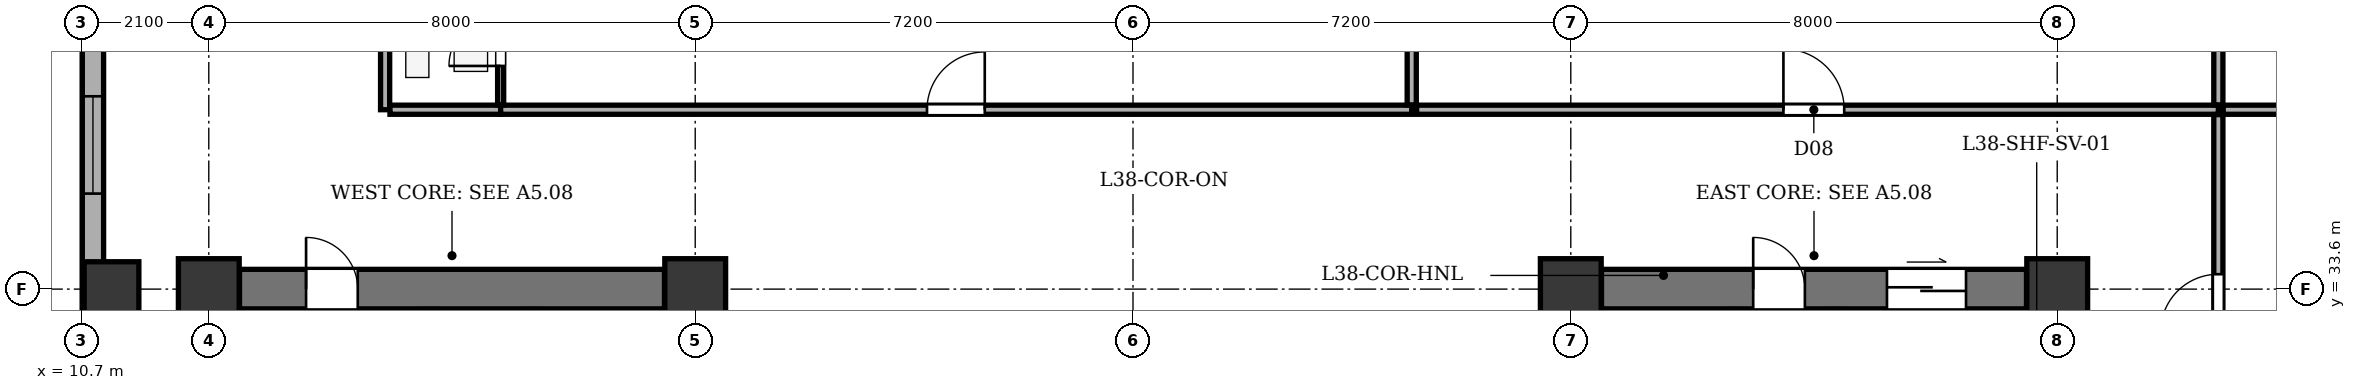
"""IFC4 building model, lengths in metres.
Left out: names, types, materials, properties, quantities, classifications, styles, units other than length and angle.
Written with IfcOpenShell. Run it as: python <this file> out.ifc"""

import sys

from ifc_helpers import new_model, si_unit, direction, frame, frame_2d, origin, origin_2d, place, context, subcontext, project, spatial, rectangle, extrude, element, fill, save


model = new_model("IFC4")
c1 = context("Model", 3, precision=1e-05, world=origin(), true_north=direction((0.0, 1.0)))
c2 = subcontext(c1, "Body", "Model", "MODEL_VIEW")
j1 = project(units=[si_unit("LENGTHUNIT", "METRE"), si_unit("PLANEANGLEUNIT", "RADIAN")], contexts=[c1])
p1 = place(None, origin())
s1 = spatial("IfcSite", under=j1, at=p1, CompositionType="ELEMENT")
p2 = place(p1, origin())
s2 = spatial("IfcBuilding", under=s1, at=p2, CompositionType="ELEMENT")
p3 = place(p2, frame((0.0, 0.0, 151.8)))
s3 = spatial("IfcBuildingStorey", under=s2, at=p3, CompositionType="ELEMENT", Elevation=151.8)
for number, where, z_axis, x_axis in (
    (1, (12.8, 33.6, 0.0), (0.0, 0.0, 1.0), (1.0, 0.0, 0.0)),
    (2, (20.8, 33.6, 0.0), (0.0, 0.0, 1.0), (1.0, 0.0, 0.0)),
    (3, (35.2, 33.6, 0.0), (0.0, 0.0, 1.0), (1.0, 0.0, 0.0)),
    (4, (43.2, 33.6, 0.0), (0.0, 0.0, 1.0), (1.0, 0.0, 0.0)),
):
    element("IfcColumn", number, at=place(p3, frame(where, z_axis=z_axis, x_axis=x_axis)), inside=s3, PredefinedType="COLUMN", context=c2, shape_type="SweptSolid", body=[
        extrude(rectangle(XDim=1.0, YDim=1.0, at=origin_2d()), origin(), (0.0, 0.0, 1.0), 3.5),
    ])
p4 = place(p3, frame((11.2, 33.6, 0.0), z_axis=(0.0, 0.0, 1.0), x_axis=(1.0, 0.0, 0.0)))
e5 = element("IfcColumn", 5, at=p4, inside=s3, PredefinedType="COLUMN", context=c2, shape_type="SweptSolid", body=[
    extrude(rectangle(XDim=0.9, YDim=0.9, at=origin_2d()), origin(), (0.0, 0.0, 1.0), 3.5),
])
p5 = place(p3, frame((10.895, 6.5, 0.0), z_axis=(0.0, 0.0, 1.0), x_axis=(0.0, 1.0, 0.0)))
e6 = element("IfcWall", 6, at=p5, inside=s3, PredefinedType="STANDARD", context=c2, shape_type="SweptSolid", body=[
    extrude(rectangle(XDim=35.0, YDim=0.35, at=frame_2d((17.5, 0.0))), origin(), (0.0, 0.0, 1.0), 2.785),
])
p6 = place(p5, frame((3.31, 0.0, 0.75)))
e7 = element("IfcOpeningElement", 7, at=p6, cuts=e6, PredefinedType="OPENING", context=c2, shape_type="SweptSolid", body=[
    extrude(rectangle(XDim=1.6, YDim=1.75, at=frame_2d((0.8, 0.875))), frame((0.0, 0.185, 0.0), z_axis=(0.0, -1.0, 0.0), x_axis=(1.0, 0.0, 0.0)), (0.0, 0.0, 1.0), 0.37),
])
p7 = place(p5, frame((9.216, 0.0, 0.75)))
e8 = element("IfcOpeningElement", 8, at=p7, cuts=e6, PredefinedType="OPENING", context=c2, shape_type="SweptSolid", body=[
    extrude(rectangle(XDim=2.1, YDim=1.75, at=frame_2d((1.05, 0.875))), frame((0.0, 0.185, 0.0), z_axis=(0.0, -1.0, 0.0), x_axis=(1.0, 0.0, 0.0)), (0.0, 0.0, 1.0), 0.37),
])
p8 = place(p5, frame((17.164, 0.0, 0.75)))
e9 = element("IfcOpeningElement", 9, at=p8, cuts=e6, PredefinedType="OPENING", context=c2, shape_type="SweptSolid", body=[
    extrude(rectangle(XDim=1.6, YDim=1.75, at=frame_2d((0.8, 0.875))), frame((0.0, 0.185, 0.0), z_axis=(0.0, -1.0, 0.0), x_axis=(1.0, 0.0, 0.0)), (0.0, 0.0, 1.0), 0.37),
])
p9 = place(p5, frame((22.386, 0.0, 0.75)))
e10 = element("IfcOpeningElement", 10, at=p9, cuts=e6, PredefinedType="OPENING", context=c2, shape_type="SweptSolid", body=[
    extrude(rectangle(XDim=2.1, YDim=1.75, at=frame_2d((1.05, 0.875))), frame((0.0, 0.185, 0.0), z_axis=(0.0, -1.0, 0.0), x_axis=(1.0, 0.0, 0.0)), (0.0, 0.0, 1.0), 0.37),
])
p10 = place(p5, frame((28.671, 0.0, 0.75)))
e11 = element("IfcOpeningElement", 11, at=p10, cuts=e6, PredefinedType="OPENING", context=c2, shape_type="SweptSolid", body=[
    extrude(rectangle(XDim=1.6, YDim=1.75, at=frame_2d((0.8, 0.875))), frame((0.0, 0.185, 0.0), z_axis=(0.0, -1.0, 0.0), x_axis=(1.0, 0.0, 0.0)), (0.0, 0.0, 1.0), 0.37),
])
p11 = place(p5, frame((31.755, 0.0, 0.75)))
e12 = element("IfcOpeningElement", 12, at=p11, cuts=e6, PredefinedType="OPENING", context=c2, shape_type="SweptSolid", body=[
    extrude(rectangle(XDim=1.6, YDim=1.75, at=frame_2d((0.8, 0.875))), frame((0.0, 0.185, 0.0), z_axis=(0.0, -1.0, 0.0), x_axis=(1.0, 0.0, 0.0)), (0.0, 0.0, 1.0), 0.37),
])
p12 = place(p3, frame((13.305, 33.6, 0.0), z_axis=(0.0, 0.0, 1.0), x_axis=(1.0, 0.0, 0.0)))
e13 = element("IfcWall", 13, at=p12, inside=s3, PredefinedType="SHEAR", context=c2, shape_type="SweptSolid", body=[
    extrude(rectangle(XDim=6.99, YDim=0.65, at=frame_2d((3.495, 0.0))), origin(), (0.0, 0.0, 1.0), 3.2),
])
p13 = place(p12, frame((1.095, 0.0, 0.0)))
e14 = element("IfcOpeningElement", 14, at=p13, cuts=e13, PredefinedType="OPENING", context=c2, shape_type="SweptSolid", body=[
    extrude(rectangle(XDim=0.85, YDim=2.02, at=frame_2d((0.425, 1.01))), frame((0.0, 0.335, 0.0), z_axis=(0.0, -1.0, 0.0), x_axis=(1.0, 0.0, 0.0)), (0.0, 0.0, 1.0), 0.67),
])
p14 = place(p3, frame((16.435, 21.135, 0.0), z_axis=(0.0, 0.0, 1.0), x_axis=(0.0, 1.0, 0.0)))
e15 = element("IfcWall", 15, at=p14, inside=s3, PredefinedType="SHEAR", context=c2, shape_type="SweptSolid", body=[
    extrude(rectangle(XDim=12.13, YDim=0.25, at=frame_2d((6.065, 0.0))), origin(), (0.0, 0.0, 1.0), 3.2),
])
p15 = place(p14, frame((0.515, 0.0, 0.0)))
e16 = element("IfcOpeningElement", 16, at=p15, cuts=e15, PredefinedType="OPENING", context=c2, shape_type="SweptSolid", body=[
    extrude(rectangle(XDim=1.2, YDim=2.15, at=frame_2d((0.6, 1.075))), frame((0.0, 0.135, 0.0), z_axis=(0.0, -1.0, 0.0), x_axis=(1.0, 0.0, 0.0)), (0.0, 0.0, 1.0), 0.27),
])
p16 = place(p14, frame((2.665, 0.0, 0.0)))
e17 = element("IfcOpeningElement", 17, at=p16, cuts=e15, PredefinedType="OPENING", context=c2, shape_type="SweptSolid", body=[
    extrude(rectangle(XDim=1.15, YDim=2.15, at=frame_2d((0.575, 1.075))), frame((0.0, 0.135, 0.0), z_axis=(0.0, -1.0, 0.0), x_axis=(1.0, 0.0, 0.0)), (0.0, 0.0, 1.0), 0.27),
])
p17 = place(p3, frame((18.12, 31.17, 0.0), z_axis=(0.0, 0.0, 1.0), x_axis=(0.0, 1.0, 0.0)))
e18 = element("IfcWall", 18, at=p17, inside=s3, PredefinedType="PARTITIONING", context=c2, shape_type="SweptSolid", body=[
    extrude(rectangle(XDim=2.095, YDim=0.18, at=frame_2d((1.047, 0.0))), origin(), (0.0, 0.0, 1.0), 3.2),
])
p18 = place(p3, frame((35.705, 33.6, 0.0), z_axis=(0.0, 0.0, 1.0), x_axis=(1.0, 0.0, 0.0)))
e19 = element("IfcWall", 19, at=p18, inside=s3, PredefinedType="SHEAR", context=c2, shape_type="SweptSolid", body=[
    extrude(rectangle(XDim=6.99, YDim=0.65, at=frame_2d((3.495, 0.0))), origin(), (0.0, 0.0, 1.0), 3.2),
])
p19 = place(p18, frame((4.695, 0.0, 0.0)))
e20 = element("IfcOpeningElement", 20, at=p19, cuts=e19, PredefinedType="OPENING", context=c2, shape_type="SweptSolid", body=[
    extrude(rectangle(XDim=1.3, YDim=2.15, at=frame_2d((0.65, 1.075))), frame((0.0, 0.335, 0.0), z_axis=(0.0, -1.0, 0.0), x_axis=(1.0, 0.0, 0.0)), (0.0, 0.0, 1.0), 0.67),
])
p20 = place(p18, frame((2.495, 0.0, 0.0)))
e21 = element("IfcOpeningElement", 21, at=p20, cuts=e19, PredefinedType="OPENING", context=c2, shape_type="SweptSolid", body=[
    extrude(rectangle(XDim=0.85, YDim=2.02, at=frame_2d((0.425, 1.01))), frame((0.0, 0.335, 0.0), z_axis=(0.0, -1.0, 0.0), x_axis=(1.0, 0.0, 0.0)), (0.0, 0.0, 1.0), 0.67),
])
p21 = place(p3, frame((39.565, 21.135, 0.0), z_axis=(0.0, 0.0, 1.0), x_axis=(0.0, 1.0, 0.0)))
e22 = element("IfcWall", 22, at=p21, inside=s3, PredefinedType="SHEAR", context=c2, shape_type="SweptSolid", body=[
    extrude(rectangle(XDim=12.13, YDim=0.25, at=frame_2d((6.065, 0.0))), origin(), (0.0, 0.0, 1.0), 3.2),
])
p22 = place(p21, frame((0.515, 0.0, 0.0)))
e23 = element("IfcOpeningElement", 23, at=p22, cuts=e22, PredefinedType="OPENING", context=c2, shape_type="SweptSolid", body=[
    extrude(rectangle(XDim=1.2, YDim=2.15, at=frame_2d((0.6, 1.075))), frame((0.0, 0.135, 0.0), z_axis=(0.0, -1.0, 0.0), x_axis=(1.0, 0.0, 0.0)), (0.0, 0.0, 1.0), 0.27),
])
p23 = place(p21, frame((2.665, 0.0, 0.0)))
e24 = element("IfcOpeningElement", 24, at=p23, cuts=e22, PredefinedType="OPENING", context=c2, shape_type="SweptSolid", body=[
    extrude(rectangle(XDim=1.15, YDim=2.15, at=frame_2d((0.575, 1.075))), frame((0.0, 0.135, 0.0), z_axis=(0.0, -1.0, 0.0), x_axis=(1.0, 0.0, 0.0)), (0.0, 0.0, 1.0), 0.27),
])
p24 = place(p3, frame((37.9, 25.27, 0.0), z_axis=(0.0, 0.0, 1.0), x_axis=(0.0, 1.0, 0.0)))
e25 = element("IfcWall", 25, at=p24, inside=s3, PredefinedType="SOLIDWALL", context=c2, shape_type="SweptSolid", body=[
    extrude(rectangle(XDim=7.995, YDim=0.2, at=frame_2d((3.998, 0.0))), origin(), (0.0, 0.0, 1.0), 3.2),
])
p25 = place(p3, frame((15.7, 36.55, 0.0), z_axis=(0.0, 0.0, 1.0), x_axis=(0.0, 1.0, 0.0)))
e26 = element("IfcWall", 26, at=p25, inside=s3, PredefinedType="PARTITIONING", context=c2, shape_type="SweptSolid", body=[
    extrude(rectangle(XDim=9.575, YDim=0.15, at=frame_2d((4.788, 0.0))), origin(), (0.0, 0.0, 1.0), 3.2),
])
p26 = place(p3, frame((15.78, 36.55, 0.0), z_axis=(0.0, 0.0, 1.0), x_axis=(1.0, 0.0, 0.0)))
e27 = element("IfcWall", 27, at=p26, inside=s3, PredefinedType="PARTITIONING", context=c2, shape_type="SweptSolid", body=[
    extrude(rectangle(XDim=1.82, YDim=0.15, at=frame_2d((0.91, 0.0))), origin(), (0.0, 0.0, 1.0), 3.2),
])
p27 = place(p3, frame((17.6, 36.55, 0.0), z_axis=(0.0, 0.0, 1.0), x_axis=(1.0, 0.0, 0.0)))
e28 = element("IfcWall", 28, at=p27, inside=s3, PredefinedType="PARTITIONING", context=c2, shape_type="SweptSolid", body=[
    extrude(rectangle(XDim=14.984, YDim=0.15, at=frame_2d((7.492, 0.0))), origin(), (0.0, 0.0, 1.0), 3.2),
])
p28 = place(p27, frame((7.012, 0.0, 0.0)))
e29 = element("IfcOpeningElement", 29, at=p28, cuts=e28, PredefinedType="OPENING", context=c2, shape_type="SweptSolid", body=[
    extrude(rectangle(XDim=0.95, YDim=2.1, at=frame_2d((0.475, 1.05))), frame((0.0, 0.085, 0.0), z_axis=(0.0, -1.0, 0.0), x_axis=(1.0, 0.0, 0.0)), (0.0, 0.0, 1.0), 0.17),
])
p29 = place(p3, frame((17.6, 36.63, 0.0), z_axis=(0.0, 0.0, 1.0), x_axis=(0.0, 1.0, 0.0)))
e30 = element("IfcWall", 30, at=p29, inside=s3, PredefinedType="PARTITIONING", context=c2, shape_type="SweptSolid", body=[
    extrude(rectangle(XDim=2.25, YDim=0.1, at=frame_2d((1.125, 0.0))), origin(), (0.0, 0.0, 1.0), 3.2),
])
p30 = place(p29, frame((0.64, 0.0, 0.0)))
e31 = element("IfcOpeningElement", 31, at=p30, cuts=e30, PredefinedType="OPENING", context=c2, shape_type="SweptSolid", body=[
    extrude(rectangle(XDim=0.85, YDim=2.05, at=frame_2d((0.425, 1.025))), frame((0.0, 0.06, 0.0), z_axis=(0.0, -1.0, 0.0), x_axis=(1.0, 0.0, 0.0)), (0.0, 0.0, 1.0), 0.12),
])
p31 = place(p3, frame((32.584, 36.63, 0.0), z_axis=(0.0, 0.0, 1.0), x_axis=(0.0, 1.0, 0.0)))
e32 = element("IfcWall", 32, at=p31, inside=s3, PredefinedType="PARTITIONING", context=c2, shape_type="SweptSolid", body=[
    extrude(rectangle(XDim=9.495, YDim=0.15, at=frame_2d((4.748, 0.0))), origin(), (0.0, 0.0, 1.0), 3.2),
])
p32 = place(p3, frame((32.664, 36.55, 0.0), z_axis=(0.0, 0.0, 1.0), x_axis=(1.0, 0.0, 0.0)))
e33 = element("IfcWall", 33, at=p32, inside=s3, PredefinedType="PARTITIONING", context=c2, shape_type="SweptSolid", body=[
    extrude(rectangle(XDim=13.186, YDim=0.15, at=frame_2d((6.593, 0.0))), origin(), (0.0, 0.0, 1.0), 3.2),
])
p33 = place(p32, frame((6.033, 0.0, 0.0)))
e34 = element("IfcOpeningElement", 34, at=p33, cuts=e33, PredefinedType="OPENING", context=c2, shape_type="SweptSolid", body=[
    extrude(rectangle(XDim=1.0, YDim=2.1, at=frame_2d((0.5, 1.05))), frame((0.0, 0.085, 0.0), z_axis=(0.0, -1.0, 0.0), x_axis=(1.0, 0.0, 0.0)), (0.0, 0.0, 1.0), 0.17),
])
p34 = place(p3, frame((45.85, 36.63, 0.0), z_axis=(0.0, 0.0, 1.0), x_axis=(0.0, 1.0, 0.0)))
e35 = element("IfcWall", 35, at=p34, inside=s3, PredefinedType="PARTITIONING", context=c2, shape_type="SweptSolid", body=[
    extrude(rectangle(XDim=9.495, YDim=0.15, at=frame_2d((4.748, 0.0))), origin(), (0.0, 0.0, 1.0), 3.2),
])
p35 = place(p3, frame((45.93, 36.55, 0.0), z_axis=(0.0, 0.0, 1.0), x_axis=(1.0, 0.0, 0.0)))
e36 = element("IfcWall", 36, at=p35, inside=s3, PredefinedType="PARTITIONING", context=c2, shape_type="SweptSolid", body=[
    extrude(rectangle(XDim=9.395, YDim=0.15, at=frame_2d((4.698, 0.0))), origin(), (0.0, 0.0, 1.0), 3.2),
])
p36 = place(p3, frame((45.85, 30.28, 0.0), z_axis=(0.0, 0.0, 1.0), x_axis=(0.0, 1.0, 0.0)))
e37 = element("IfcWall", 37, at=p36, inside=s3, PredefinedType="PARTITIONING", context=c2, shape_type="SweptSolid", body=[
    extrude(rectangle(XDim=6.19, YDim=0.15, at=frame_2d((3.095, 0.0))), origin(), (0.0, 0.0, 1.0), 3.2),
])
p37 = place(p36, frame((2.615, 0.0, 0.0)))
e38 = element("IfcOpeningElement", 38, at=p37, cuts=e37, PredefinedType="OPENING", context=c2, shape_type="SweptSolid", body=[
    extrude(rectangle(XDim=0.95, YDim=2.1, at=frame_2d((0.475, 1.05))), frame((0.0, 0.085, 0.0), z_axis=(0.0, -1.0, 0.0), x_axis=(1.0, 0.0, 0.0)), (0.0, 0.0, 1.0), 0.17),
])
p38 = place(p10, origin())
e39 = element("IfcWindow", 39, at=p38, inside=s3, PartitioningType="SINGLE_PANEL", PredefinedType="WINDOW", context=c2, shape_type="SweptSolid", body=[
    extrude(rectangle(XDim=1.6, YDim=1.75, at=frame_2d((0.8, 0.875))), frame((0.0, -0.01, 0.0), z_axis=(0.0, -1.0, 0.0), x_axis=(1.0, 0.0, 0.0)), (0.0, 0.0, 1.0), 0.06),
])
fill(e11, e39)
p39 = place(p13, origin())
e40 = element("IfcDoor", 40, at=p39, inside=s3, OperationType="SINGLE_SWING_LEFT", PredefinedType="DOOR", context=c2, shape_type="SweptSolid", body=[
    extrude(rectangle(XDim=0.85, YDim=2.02, at=frame_2d((0.425, 1.01))), frame((0.0, 0.025, 0.0), z_axis=(0.0, -1.0, 0.0), x_axis=(1.0, 0.0, 0.0)), (0.0, 0.0, 1.0), 0.05),
])
fill(e14, e40)
p40 = place(p19, origin())
e41 = element("IfcDoor", 41, at=p40, inside=s3, OperationType="DOUBLE_DOOR_SLIDING", PredefinedType="DOOR", context=c2, shape_type="SweptSolid", body=[
    extrude(rectangle(XDim=1.3, YDim=2.15, at=frame_2d((0.65, 1.075))), frame((0.0, 0.025, 0.0), z_axis=(0.0, -1.0, 0.0), x_axis=(1.0, 0.0, 0.0)), (0.0, 0.0, 1.0), 0.05),
])
fill(e20, e41)
p41 = place(p20, origin())
e42 = element("IfcDoor", 42, at=p41, inside=s3, OperationType="SINGLE_SWING_LEFT", PredefinedType="DOOR", context=c2, shape_type="SweptSolid", body=[
    extrude(rectangle(XDim=0.85, YDim=2.02, at=frame_2d((0.425, 1.01))), frame((0.0, 0.025, 0.0), z_axis=(0.0, -1.0, 0.0), x_axis=(1.0, 0.0, 0.0)), (0.0, 0.0, 1.0), 0.05),
])
fill(e21, e42)
p42 = place(p30, origin())
e43 = element("IfcDoor", 43, at=p42, inside=s3, OperationType="SINGLE_SWING_LEFT", PredefinedType="DOOR", context=c2, shape_type="SweptSolid", body=[
    extrude(rectangle(XDim=0.85, YDim=2.05, at=frame_2d((0.425, 1.025))), frame((0.0, 0.025, 0.0), z_axis=(0.0, -1.0, 0.0), x_axis=(1.0, 0.0, 0.0)), (0.0, 0.0, 1.0), 0.05),
])
fill(e31, e43)
p43 = place(p28, origin())
e44 = element("IfcDoor", 44, at=p43, inside=s3, OperationType="SINGLE_SWING_RIGHT", PredefinedType="DOOR", context=c2, shape_type="SweptSolid", body=[
    extrude(rectangle(XDim=0.95, YDim=2.1, at=frame_2d((0.475, 1.05))), frame((0.0, 0.025, 0.0), z_axis=(0.0, -1.0, 0.0), x_axis=(1.0, 0.0, 0.0)), (0.0, 0.0, 1.0), 0.05),
])
fill(e29, e44)
p44 = place(p33, origin())
e45 = element("IfcDoor", 45, at=p44, inside=s3, OperationType="SINGLE_SWING_LEFT", PredefinedType="DOOR", context=c2, shape_type="SweptSolid", body=[
    extrude(rectangle(XDim=1.0, YDim=2.1, at=frame_2d((0.5, 1.05))), frame((0.0, 0.025, 0.0), z_axis=(0.0, -1.0, 0.0), x_axis=(1.0, 0.0, 0.0)), (0.0, 0.0, 1.0), 0.05),
])
fill(e34, e45)
p45 = place(p37, origin())
e46 = element("IfcDoor", 46, at=p45, inside=s3, OperationType="SINGLE_SWING_LEFT", PredefinedType="DOOR", context=c2, shape_type="SweptSolid", body=[
    extrude(rectangle(XDim=0.95, YDim=2.1, at=frame_2d((0.475, 1.05))), frame((0.0, 0.025, 0.0), z_axis=(0.0, -1.0, 0.0), x_axis=(1.0, 0.0, 0.0)), (0.0, 0.0, 1.0), 0.05),
])
fill(e38, e46)
save(model, sys.argv[1])
